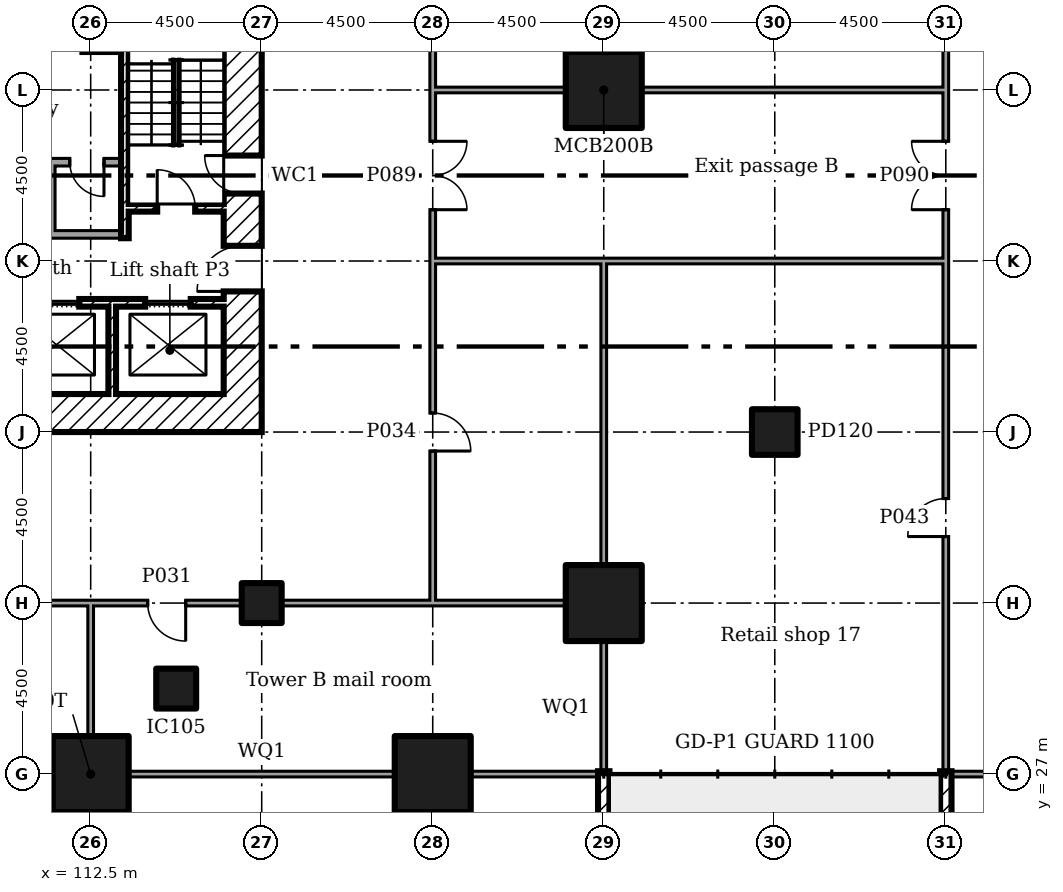
"""IFC4 building model, lengths in metres.
Left out: names, types, materials, properties, quantities, classifications, styles, units other than length and angle.
Written with IfcOpenShell. Run it as: python <this file> out.ifc"""

import sys

from ifc_helpers import new_model, si_unit, direction, frame, frame_2d, origin, origin_2d, place, context, subcontext, project, spatial, rectangle, extrude, element, fill, save


model = new_model("IFC4")
c1 = context("Model", 3, precision=1e-05, world=origin(), true_north=direction((0.0, 1.0)))
c2 = subcontext(c1, "Body", "Model", "MODEL_VIEW")
j1 = project(units=[si_unit("LENGTHUNIT", "METRE"), si_unit("PLANEANGLEUNIT", "RADIAN")], contexts=[c1])
p1 = place(None, origin())
s1 = spatial("IfcSite", under=j1, at=p1, CompositionType="ELEMENT")
p2 = place(p1, origin())
s2 = spatial("IfcBuilding", under=s1, at=p2, CompositionType="ELEMENT")
p3 = place(p2, origin())
s3 = spatial("IfcBuildingStorey", under=s2, at=p3, CompositionType="ELEMENT", Elevation=0.0)
for number, where in (
    (1, (112.5, 27.0, 0.0)),
    (2, (121.5, 27.0, 0.0)),
    (3, (126.0, 31.5, 0.0)),
    (4, (126.0, 45.0, 0.0)),
):
    element("IfcColumn", number, at=place(p3, frame(where)), inside=s3, PredefinedType="COLUMN", context=c2, shape_type="SweptSolid", body=[
        extrude(rectangle(XDim=2.0, YDim=2.0, at=origin_2d()), origin(), (0.0, 0.0, 1.0), 6.0),
    ])
for number, where in (
    (5, (114.75, 29.25, 0.0)),
    (6, (117.0, 31.5, 0.0)),
):
    element("IfcColumn", number, at=place(p3, frame(where)), inside=s3, PredefinedType="COLUMN", context=c2, shape_type="SweptSolid", body=[
        extrude(rectangle(XDim=1.05, YDim=1.05, at=origin_2d()), origin(), (0.0, 0.0, 1.0), 6.0),
    ])
p4 = place(p3, frame((130.5, 36.0, 0.0)))
e7 = element("IfcColumn", 7, at=p4, inside=s3, PredefinedType="COLUMN", context=c2, shape_type="SweptSolid", body=[
    extrude(rectangle(XDim=1.2, YDim=1.2, at=origin_2d()), origin(), (0.0, 0.0, 1.0), 6.0),
])
p5 = place(p3, frame((116.5, 36.0, 0.0), z_axis=(0.0, 0.0, 1.0), x_axis=(0.0, 1.0, 0.0)))
e8 = element("IfcWall", 8, at=p5, inside=s3, PredefinedType="SHEAR", context=c2, shape_type="SweptSolid", body=[
    extrude(rectangle(XDim=13.5, YDim=1.0, at=frame_2d((6.75, 0.0))), origin(), (0.0, 0.0, 1.0), 5.5),
])
p6 = place(p5, frame((3.7, 0.0, 0.0)))
e9 = element("IfcOpeningElement", 9, at=p6, cuts=e8, PredefinedType="OPENING", context=c2, shape_type="SweptSolid", body=[
    extrude(rectangle(XDim=1.2, YDim=2.1, at=frame_2d((0.6, 1.05))), frame((0.0, 0.51, 0.0), z_axis=(0.0, -1.0, 0.0), x_axis=(1.0, 0.0, 0.0)), (0.0, 0.0, 1.0), 1.02),
])
p7 = place(p5, frame((6.275, 0.0, 0.0)))
e10 = element("IfcOpeningElement", 10, at=p7, cuts=e8, PredefinedType="OPENING", context=c2, shape_type="SweptSolid", body=[
    extrude(rectangle(XDim=1.0, YDim=2.1, at=frame_2d((0.5, 1.05))), frame((0.0, 0.51, 0.0), z_axis=(0.0, -1.0, 0.0), x_axis=(1.0, 0.0, 0.0)), (0.0, 0.0, 1.0), 1.02),
])
p8 = place(p3, frame((104.5, 36.5, 0.0)))
e11 = element("IfcWall", 11, at=p8, inside=s3, PredefinedType="SHEAR", context=c2, shape_type="SweptSolid", body=[
    extrude(rectangle(XDim=11.5, YDim=1.0, at=frame_2d((5.75, 0.0))), origin(), (0.0, 0.0, 1.0), 5.5),
])
p9 = place(p3, frame((113.067, 37.0, 0.0), z_axis=(0.0, 0.0, 1.0), x_axis=(0.0, 1.0, 0.0)))
e12 = element("IfcWall", 12, at=p9, inside=s3, PredefinedType="SHEAR", context=c2, shape_type="SweptSolid", body=[
    extrude(rectangle(XDim=2.3, YDim=0.2, at=frame_2d((1.15, 0.0))), origin(), (0.0, 0.0, 1.0), 5.5),
])
p10 = place(p3, frame((107.2, 39.4, 0.0)))
e13 = element("IfcWall", 13, at=p10, inside=s3, PredefinedType="SHEAR", context=c2, shape_type="SweptSolid", body=[
    extrude(rectangle(XDim=8.8, YDim=0.2, at=frame_2d((4.4, 0.0))), origin(), (0.0, 0.0, 1.0), 5.5),
])
p11 = place(p10, frame((0.867, 0.0, 0.0)))
e14 = element("IfcOpeningElement", 14, at=p11, cuts=e13, PredefinedType="OPENING", context=c2, shape_type="SweptSolid", body=[
    extrude(rectangle(XDim=1.2, YDim=2.1, at=frame_2d((0.6, 1.05))), frame((0.0, 0.11, 0.0), z_axis=(0.0, -1.0, 0.0), x_axis=(1.0, 0.0, 0.0)), (0.0, 0.0, 1.0), 0.22),
])
p12 = place(p10, frame((3.8, 0.0, 0.0)))
e15 = element("IfcOpeningElement", 15, at=p12, cuts=e13, PredefinedType="OPENING", context=c2, shape_type="SweptSolid", body=[
    extrude(rectangle(XDim=1.2, YDim=2.1, at=frame_2d((0.6, 1.05))), frame((0.0, 0.11, 0.0), z_axis=(0.0, -1.0, 0.0), x_axis=(1.0, 0.0, 0.0)), (0.0, 0.0, 1.0), 0.22),
])
p13 = place(p10, frame((6.733, 0.0, 0.0)))
e16 = element("IfcOpeningElement", 16, at=p13, cuts=e13, PredefinedType="OPENING", context=c2, shape_type="SweptSolid", body=[
    extrude(rectangle(XDim=1.2, YDim=2.1, at=frame_2d((0.6, 1.05))), frame((0.0, 0.11, 0.0), z_axis=(0.0, -1.0, 0.0), x_axis=(1.0, 0.0, 0.0)), (0.0, 0.0, 1.0), 0.22),
])
p14 = place(p3, frame((113.5, 41.9, 0.0)))
e17 = element("IfcWall", 17, at=p14, inside=s3, PredefinedType="SHEAR", context=c2, shape_type="SweptSolid", body=[
    extrude(rectangle(XDim=2.5, YDim=0.2, at=frame_2d((1.25, 0.0))), origin(), (0.0, 0.0, 1.0), 5.5),
])
p15 = place(p14, frame((0.75, 0.0, 0.0)))
e18 = element("IfcOpeningElement", 18, at=p15, cuts=e17, PredefinedType="OPENING", context=c2, shape_type="SweptSolid", body=[
    extrude(rectangle(XDim=1.0, YDim=2.1, at=frame_2d((0.5, 1.05))), frame((0.0, 0.11, 0.0), z_axis=(0.0, -1.0, 0.0), x_axis=(1.0, 0.0, 0.0)), (0.0, 0.0, 1.0), 0.22),
])
p16 = place(p3, frame((113.4, 41.1, 0.0), z_axis=(0.0, 0.0, 1.0), x_axis=(0.0, 1.0, 0.0)))
e19 = element("IfcWall", 19, at=p16, inside=s3, PredefinedType="SHEAR", context=c2, shape_type="SweptSolid", body=[
    extrude(rectangle(XDim=7.4, YDim=0.2, at=frame_2d((3.7, 0.0))), origin(), (0.0, 0.0, 1.0), 5.5),
])
p17 = place(p3, frame((107.2, 43.1, 0.0)))
e20 = element("IfcWall", 20, at=p17, inside=s3, PredefinedType="PARTITIONING", context=c2, shape_type="SweptSolid", body=[
    extrude(rectangle(XDim=6.1, YDim=0.2, at=frame_2d((3.05, 0.0))), origin(), (0.0, 0.0, 1.0), 5.5),
])
p18 = place(p17, frame((4.75, 0.0, 0.0)))
e21 = element("IfcOpeningElement", 21, at=p18, cuts=e20, PredefinedType="OPENING", context=c2, shape_type="SweptSolid", body=[
    extrude(rectangle(XDim=0.9, YDim=2.1, at=frame_2d((0.45, 1.05))), frame((0.0, 0.11, 0.0), z_axis=(0.0, -1.0, 0.0), x_axis=(1.0, 0.0, 0.0)), (0.0, 0.0, 1.0), 0.22),
])
p19 = place(p3, frame((107.2, 41.2, 0.0)))
e22 = element("IfcWall", 22, at=p19, inside=s3, PredefinedType="PARTITIONING", context=c2, shape_type="SweptSolid", body=[
    extrude(rectangle(XDim=6.1, YDim=0.2, at=frame_2d((3.05, 0.0))), origin(), (0.0, 0.0, 1.0), 5.5),
])
p20 = place(p19, frame((0.4, 0.0, 0.0)))
e23 = element("IfcOpeningElement", 23, at=p20, cuts=e22, PredefinedType="OPENING", context=c2, shape_type="SweptSolid", body=[
    extrude(rectangle(XDim=0.9, YDim=2.1, at=frame_2d((0.45, 1.05))), frame((0.0, 0.11, 0.0), z_axis=(0.0, -1.0, 0.0), x_axis=(1.0, 0.0, 0.0)), (0.0, 0.0, 1.0), 0.22),
])
p21 = place(p19, frame((2.55, 0.0, 0.0)))
e24 = element("IfcOpeningElement", 24, at=p21, cuts=e22, PredefinedType="OPENING", context=c2, shape_type="SweptSolid", body=[
    extrude(rectangle(XDim=0.9, YDim=2.1, at=frame_2d((0.45, 1.05))), frame((0.0, 0.11, 0.0), z_axis=(0.0, -1.0, 0.0), x_axis=(1.0, 0.0, 0.0)), (0.0, 0.0, 1.0), 0.22),
])
p22 = place(p3, frame((111.5, 41.3, 0.0), z_axis=(0.0, 0.0, 1.0), x_axis=(0.0, 1.0, 0.0)))
e25 = element("IfcWall", 25, at=p22, inside=s3, PredefinedType="PARTITIONING", context=c2, shape_type="SweptSolid", body=[
    extrude(rectangle(XDim=1.7, YDim=0.125, at=frame_2d((0.85, 0.0))), origin(), (0.0, 0.0, 1.0), 5.5),
])
p23 = place(p3, frame((99.075, 31.5, 0.0)))
e26 = element("IfcWall", 26, at=p23, inside=s3, PredefinedType="PARTITIONING", context=c2, shape_type="SweptSolid", body=[
    extrude(rectangle(XDim=13.5, YDim=0.15, at=frame_2d((6.75, 0.0))), origin(), (0.0, 0.0, 1.0), 5.55),
])
p24 = place(p23, frame((6.175, 0.0, 0.0)))
e27 = element("IfcOpeningElement", 27, at=p24, cuts=e26, PredefinedType="OPENING", context=c2, shape_type="SweptSolid", body=[
    extrude(rectangle(XDim=1.0, YDim=2.1, at=frame_2d((0.5, 1.05))), frame((0.0, 0.085, 0.0), z_axis=(0.0, -1.0, 0.0), x_axis=(1.0, 0.0, 0.0)), (0.0, 0.0, 1.0), 0.17),
])
p25 = place(p3, frame((112.5, 31.5, 0.0)))
e28 = element("IfcWall", 28, at=p25, inside=s3, PredefinedType="PARTITIONING", context=c2, shape_type="SweptSolid", body=[
    extrude(rectangle(XDim=3.98, YDim=0.15, at=frame_2d((1.99, 0.0))), origin(), (0.0, 0.0, 1.0), 5.55),
])
p26 = place(p25, frame((1.5, 0.0, 0.0)))
e29 = element("IfcOpeningElement", 29, at=p26, cuts=e28, PredefinedType="OPENING", context=c2, shape_type="SweptSolid", body=[
    extrude(rectangle(XDim=1.0, YDim=2.1, at=frame_2d((0.5, 1.05))), frame((0.0, 0.085, 0.0), z_axis=(0.0, -1.0, 0.0), x_axis=(1.0, 0.0, 0.0)), (0.0, 0.0, 1.0), 0.17),
])
p27 = place(p3, frame((117.52, 31.5, 0.0)))
e30 = element("IfcWall", 30, at=p27, inside=s3, PredefinedType="PARTITIONING", context=c2, shape_type="SweptSolid", body=[
    extrude(rectangle(XDim=4.055, YDim=0.15, at=frame_2d((2.027, 0.0))), origin(), (0.0, 0.0, 1.0), 5.55),
])
p28 = place(p3, frame((121.5, 31.575, 0.0), z_axis=(0.0, 0.0, 1.0), x_axis=(0.0, 1.0, 0.0)))
e31 = element("IfcWall", 31, at=p28, inside=s3, PredefinedType="PARTITIONING", context=c2, shape_type="SweptSolid", body=[
    extrude(rectangle(XDim=9.0, YDim=0.15, at=frame_2d((4.5, 0.0))), origin(), (0.0, 0.0, 1.0), 5.55),
])
p29 = place(p28, frame((3.925, 0.0, 0.0)))
e32 = element("IfcOpeningElement", 32, at=p29, cuts=e31, PredefinedType="OPENING", context=c2, shape_type="SweptSolid", body=[
    extrude(rectangle(XDim=1.0, YDim=2.1, at=frame_2d((0.5, 1.05))), frame((0.0, 0.085, 0.0), z_axis=(0.0, -1.0, 0.0), x_axis=(1.0, 0.0, 0.0)), (0.0, 0.0, 1.0), 0.17),
])
p30 = place(p3, frame((121.5, 40.5, 0.0), z_axis=(0.0, 0.0, 1.0), x_axis=(0.0, 1.0, 0.0)))
e33 = element("IfcWall", 33, at=p30, inside=s3, PredefinedType="PARTITIONING", context=c2, shape_type="SweptSolid", body=[
    extrude(rectangle(XDim=4.575, YDim=0.15, at=frame_2d((2.288, 0.0))), origin(), (0.0, 0.0, 1.0), 5.55),
])
p31 = place(p30, frame((1.35, 0.0, 0.0)))
e34 = element("IfcOpeningElement", 34, at=p31, cuts=e33, PredefinedType="OPENING", context=c2, shape_type="SweptSolid", body=[
    extrude(rectangle(XDim=1.8, YDim=2.1, at=frame_2d((0.9, 1.05))), frame((0.0, 0.085, 0.0), z_axis=(0.0, -1.0, 0.0), x_axis=(1.0, 0.0, 0.0)), (0.0, 0.0, 1.0), 0.17),
])
p32 = place(p3, frame((121.5, 45.0, 0.0), z_axis=(0.0, 0.0, 1.0), x_axis=(0.0, 1.0, 0.0)))
e35 = element("IfcWall", 35, at=p32, inside=s3, PredefinedType="PARTITIONING", context=c2, shape_type="SweptSolid", body=[
    extrude(rectangle(XDim=3.98, YDim=0.15, at=frame_2d((1.99, 0.0))), origin(), (0.0, 0.0, 1.0), 5.55),
])
p33 = place(p32, frame((1.5, 0.0, 0.0)))
e36 = element("IfcOpeningElement", 36, at=p33, cuts=e35, PredefinedType="OPENING", context=c2, shape_type="SweptSolid", body=[
    extrude(rectangle(XDim=1.0, YDim=2.1, at=frame_2d((0.5, 1.05))), frame((0.0, 0.085, 0.0), z_axis=(0.0, -1.0, 0.0), x_axis=(1.0, 0.0, 0.0)), (0.0, 0.0, 1.0), 0.17),
])
p34 = place(p3, frame((112.5, 27.995, 0.0), z_axis=(0.0, 0.0, 1.0), x_axis=(0.0, 1.0, 0.0)))
e37 = element("IfcWall", 37, at=p34, inside=s3, PredefinedType="PARTITIONING", context=c2, shape_type="SweptSolid", body=[
    extrude(rectangle(XDim=3.43, YDim=0.15, at=frame_2d((1.715, 0.0))), origin(), (0.0, 0.0, 1.0), 5.55),
])
p35 = place(p3, frame((99.995, 27.0, 0.0)))
e38 = element("IfcWall", 38, at=p35, inside=s3, PredefinedType="PARTITIONING", context=c2, shape_type="SweptSolid", body=[
    extrude(rectangle(XDim=11.51, YDim=0.15, at=frame_2d((5.755, 0.0))), origin(), (0.0, 0.0, 1.0), 5.55),
])
p36 = place(p3, frame((121.5, 31.5, 0.0)))
e39 = element("IfcWall", 39, at=p36, inside=s3, PredefinedType="PARTITIONING", context=c2, shape_type="SweptSolid", body=[
    extrude(rectangle(XDim=3.505, YDim=0.15, at=frame_2d((1.752, 0.0))), origin(), (0.0, 0.0, 1.0), 5.55),
])
p37 = place(p3, frame((113.495, 27.0, 0.0)))
e40 = element("IfcWall", 40, at=p37, inside=s3, PredefinedType="PARTITIONING", context=c2, shape_type="SweptSolid", body=[
    extrude(rectangle(XDim=7.01, YDim=0.15, at=frame_2d((3.505, 0.0))), origin(), (0.0, 0.0, 1.0), 5.55),
])
p38 = place(p3, frame((122.495, 27.0, 0.0)))
e41 = element("IfcWall", 41, at=p38, inside=s3, PredefinedType="PARTITIONING", context=c2, shape_type="SweptSolid", body=[
    extrude(rectangle(XDim=3.355, YDim=0.15, at=frame_2d((1.677, 0.0))), origin(), (0.0, 0.0, 1.0), 5.55),
])
p39 = place(p3, frame((126.0, 27.0, 0.0), z_axis=(0.0, 0.0, 1.0), x_axis=(0.0, 1.0, 0.0)))
e42 = element("IfcWall", 42, at=p39, inside=s3, PredefinedType="PARTITIONING", context=c2, shape_type="SweptSolid", body=[
    extrude(rectangle(XDim=3.505, YDim=0.15, at=frame_2d((1.752, 0.0))), origin(), (0.0, 0.0, 1.0), 5.55),
])
p40 = place(p3, frame((121.575, 40.5, 0.0)))
e43 = element("IfcWall", 43, at=p40, inside=s3, PredefinedType="PARTITIONING", context=c2, shape_type="SweptSolid", body=[
    extrude(rectangle(XDim=4.5, YDim=0.15, at=frame_2d((2.25, 0.0))), origin(), (0.0, 0.0, 1.0), 5.55),
])
p41 = place(p3, frame((126.0, 32.495, 0.0), z_axis=(0.0, 0.0, 1.0), x_axis=(0.0, 1.0, 0.0)))
e44 = element("IfcWall", 44, at=p41, inside=s3, PredefinedType="PARTITIONING", context=c2, shape_type="SweptSolid", body=[
    extrude(rectangle(XDim=7.93, YDim=0.15, at=frame_2d((3.965, 0.0))), origin(), (0.0, 0.0, 1.0), 5.55),
])
p42 = place(p3, frame((121.575, 45.0, 0.0)))
e45 = element("IfcWall", 45, at=p42, inside=s3, PredefinedType="PARTITIONING", context=c2, shape_type="SweptSolid", body=[
    extrude(rectangle(XDim=3.43, YDim=0.15, at=frame_2d((1.715, 0.0))), origin(), (0.0, 0.0, 1.0), 5.55),
])
p43 = place(p3, frame((126.0, 40.5, 0.0)))
e46 = element("IfcWall", 46, at=p43, inside=s3, PredefinedType="PARTITIONING", context=c2, shape_type="SweptSolid", body=[
    extrude(rectangle(XDim=9.075, YDim=0.15, at=frame_2d((4.538, 0.0))), origin(), (0.0, 0.0, 1.0), 5.55),
])
p44 = place(p3, frame((126.995, 45.0, 0.0)))
e47 = element("IfcWall", 47, at=p44, inside=s3, PredefinedType="PARTITIONING", context=c2, shape_type="SweptSolid", body=[
    extrude(rectangle(XDim=8.08, YDim=0.15, at=frame_2d((4.04, 0.0))), origin(), (0.0, 0.0, 1.0), 5.55),
])
p45 = place(p3, frame((135.0, 40.5, 0.0), z_axis=(0.0, 0.0, 1.0), x_axis=(0.0, 1.0, 0.0)))
e48 = element("IfcWall", 48, at=p45, inside=s3, PredefinedType="PARTITIONING", context=c2, shape_type="SweptSolid", body=[
    extrude(rectangle(XDim=4.425, YDim=0.15, at=frame_2d((2.212, 0.0))), origin(), (0.0, 0.0, 1.0), 5.55),
])
p46 = place(p45, frame((1.35, 0.0, 0.0)))
e49 = element("IfcOpeningElement", 49, at=p46, cuts=e48, PredefinedType="OPENING", context=c2, shape_type="SweptSolid", body=[
    extrude(rectangle(XDim=1.8, YDim=2.1, at=frame_2d((0.9, 1.05))), frame((0.0, 0.085, 0.0), z_axis=(0.0, -1.0, 0.0), x_axis=(1.0, 0.0, 0.0)), (0.0, 0.0, 1.0), 0.17),
])
p47 = place(p3, frame((126.0, 45.995, 0.0), z_axis=(0.0, 0.0, 1.0), x_axis=(0.0, 1.0, 0.0)))
e50 = element("IfcWall", 50, at=p47, inside=s3, PredefinedType="PARTITIONING", context=c2, shape_type="SweptSolid", body=[
    extrude(rectangle(XDim=7.01, YDim=0.15, at=frame_2d((3.505, 0.0))), origin(), (0.0, 0.0, 1.0), 5.55),
])
p48 = place(p3, frame((112.5, 18.075, 0.0), z_axis=(0.0, 0.0, 1.0), x_axis=(0.0, 1.0, 0.0)))
e51 = element("IfcWall", 51, at=p48, inside=s3, PredefinedType="PARTITIONING", context=c2, shape_type="SweptSolid", body=[
    extrude(rectangle(XDim=7.93, YDim=0.15, at=frame_2d((3.965, 0.0))), origin(), (0.0, 0.0, 1.0), 5.55),
])
p49 = place(p3, frame((135.15, 27.0, 0.0)))
e52 = element("IfcWall", 52, at=p49, inside=s3, PredefinedType="PARTITIONING", context=c2, shape_type="SweptSolid", body=[
    extrude(rectangle(XDim=4.25, YDim=0.15, at=frame_2d((2.125, 0.0))), origin(), (0.0, 0.0, 1.0), 5.55),
])
p50 = place(p49, frame((1.2, 0.0, 0.0)))
e53 = element("IfcOpeningElement", 53, at=p50, cuts=e52, PredefinedType="OPENING", context=c2, shape_type="SweptSolid", body=[
    extrude(rectangle(XDim=1.8, YDim=2.1, at=frame_2d((0.9, 1.05))), frame((0.0, 0.085, 0.0), z_axis=(0.0, -1.0, 0.0), x_axis=(1.0, 0.0, 0.0)), (0.0, 0.0, 1.0), 0.17),
])
p51 = place(p3, frame((135.0, 27.0, 0.0), z_axis=(0.0, 0.0, 1.0), x_axis=(0.0, 1.0, 0.0)))
e54 = element("IfcWall", 54, at=p51, inside=s3, PredefinedType="PARTITIONING", context=c2, shape_type="SweptSolid", body=[
    extrude(rectangle(XDim=13.425, YDim=0.15, at=frame_2d((6.712, 0.0))), origin(), (0.0, 0.0, 1.0), 5.55),
])
p52 = place(p51, frame((6.25, 0.0, 0.0)))
e55 = element("IfcOpeningElement", 55, at=p52, cuts=e54, PredefinedType="OPENING", context=c2, shape_type="SweptSolid", body=[
    extrude(rectangle(XDim=1.0, YDim=2.1, at=frame_2d((0.5, 1.05))), frame((0.0, 0.085, 0.0), z_axis=(0.0, -1.0, 0.0), x_axis=(1.0, 0.0, 0.0)), (0.0, 0.0, 1.0), 0.17),
])
p53 = place(p3, frame((135.0, 45.0, 0.0), z_axis=(0.0, 0.0, 1.0), x_axis=(0.0, 1.0, 0.0)))
e56 = element("IfcWall", 56, at=p53, inside=s3, PredefinedType="PARTITIONING", context=c2, shape_type="SweptSolid", body=[
    extrude(rectangle(XDim=13.575, YDim=0.15, at=frame_2d((6.788, 0.0))), origin(), (0.0, 0.0, 1.0), 5.55),
])
p54 = place(p53, frame((6.25, 0.0, 0.0)))
e57 = element("IfcOpeningElement", 57, at=p54, cuts=e56, PredefinedType="OPENING", context=c2, shape_type="SweptSolid", body=[
    extrude(rectangle(XDim=1.0, YDim=2.1, at=frame_2d((0.5, 1.05))), frame((0.0, 0.085, 0.0), z_axis=(0.0, -1.0, 0.0), x_axis=(1.0, 0.0, 0.0)), (0.0, 0.0, 1.0), 0.17),
])
for number, where, z_axis, x_axis in (
    (58, (126.0, 1.5, 0.0), (0.0, 0.0, 1.0), (0.0, 1.0, 0.0)),
    (59, (135.0, 1.5, 0.0), (0.0, 0.0, 1.0), (0.0, 1.0, 0.0)),
):
    element("IfcWall", number, at=place(p3, frame(where, z_axis=z_axis, x_axis=x_axis)), inside=s3, PredefinedType="SOLIDWALL", context=c2, shape_type="SweptSolid", body=[
        extrude(rectangle(XDim=25.575, YDim=0.3, at=frame_2d((12.788, 0.0))), origin(), (0.0, 0.0, 1.0), 1.1),
    ])
p55 = place(p6, origin())
e60 = element("IfcDoor", 60, at=p55, inside=s3, OperationType="SINGLE_SWING_RIGHT", PredefinedType="DOOR", context=c2, shape_type="SweptSolid", body=[
    extrude(rectangle(XDim=1.2, YDim=2.1, at=frame_2d((0.6, 1.05))), frame((0.0, 0.025, 0.0), z_axis=(0.0, -1.0, 0.0), x_axis=(1.0, 0.0, 0.0)), (0.0, 0.0, 1.0), 0.05),
])
fill(e9, e60)
p56 = place(p15, origin())
e61 = element("IfcDoor", 61, at=p56, inside=s3, OperationType="SINGLE_SWING_RIGHT", PredefinedType="DOOR", context=c2, shape_type="SweptSolid", body=[
    extrude(rectangle(XDim=1.0, YDim=2.1, at=frame_2d((0.5, 1.05))), frame((0.0, 0.025, 0.0), z_axis=(0.0, -1.0, 0.0), x_axis=(1.0, 0.0, 0.0)), (0.0, 0.0, 1.0), 0.05),
])
fill(e18, e61)
p57 = place(p7, origin())
e62 = element("IfcDoor", 62, at=p57, inside=s3, OperationType="SINGLE_SWING_LEFT", PredefinedType="DOOR", context=c2, shape_type="SweptSolid", body=[
    extrude(rectangle(XDim=1.0, YDim=2.1, at=frame_2d((0.5, 1.05))), frame((0.0, 0.025, 0.0), z_axis=(0.0, -1.0, 0.0), x_axis=(1.0, 0.0, 0.0)), (0.0, 0.0, 1.0), 0.05),
])
fill(e10, e62)
p58 = place(p18, frame((0.9, 0.0, 0.0), x_axis=(-1.0, 0.0, 0.0)))
e63 = element("IfcDoor", 63, at=p58, inside=s3, OperationType="SINGLE_SWING_RIGHT", PredefinedType="DOOR", context=c2, shape_type="SweptSolid", body=[
    extrude(rectangle(XDim=0.9, YDim=2.1, at=frame_2d((0.45, 1.05))), frame((0.0, 0.025, 0.0), z_axis=(0.0, -1.0, 0.0), x_axis=(1.0, 0.0, 0.0)), (0.0, 0.0, 1.0), 0.05),
])
fill(e21, e63)
p59 = place(p12, origin())
e64 = element("IfcDoor", 64, at=p59, inside=s3, OperationType="SLIDING_TO_LEFT", PredefinedType="DOOR", context=c2, shape_type="SweptSolid", body=[
    extrude(rectangle(XDim=1.2, YDim=2.1, at=frame_2d((0.6, 1.05))), frame((0.0, 0.025, 0.0), z_axis=(0.0, -1.0, 0.0), x_axis=(1.0, 0.0, 0.0)), (0.0, 0.0, 1.0), 0.05),
])
fill(e15, e64)
p60 = place(p13, origin())
e65 = element("IfcDoor", 65, at=p60, inside=s3, OperationType="SLIDING_TO_LEFT", PredefinedType="DOOR", context=c2, shape_type="SweptSolid", body=[
    extrude(rectangle(XDim=1.2, YDim=2.1, at=frame_2d((0.6, 1.05))), frame((0.0, 0.025, 0.0), z_axis=(0.0, -1.0, 0.0), x_axis=(1.0, 0.0, 0.0)), (0.0, 0.0, 1.0), 0.05),
])
fill(e16, e65)
p61 = place(p26, frame((1.0, 0.0, 0.0), x_axis=(-1.0, 0.0, 0.0)))
e66 = element("IfcDoor", 66, at=p61, inside=s3, OperationType="SINGLE_SWING_RIGHT", PredefinedType="DOOR", context=c2, shape_type="SweptSolid", body=[
    extrude(rectangle(XDim=1.0, YDim=2.1, at=frame_2d((0.5, 1.05))), frame((0.0, 0.025, 0.0), z_axis=(0.0, -1.0, 0.0), x_axis=(1.0, 0.0, 0.0)), (0.0, 0.0, 1.0), 0.05),
])
fill(e29, e66)
p62 = place(p29, frame((1.0, 0.0, 0.0), x_axis=(-1.0, 0.0, 0.0)))
e67 = element("IfcDoor", 67, at=p62, inside=s3, OperationType="SINGLE_SWING_LEFT", PredefinedType="DOOR", context=c2, shape_type="SweptSolid", body=[
    extrude(rectangle(XDim=1.0, YDim=2.1, at=frame_2d((0.5, 1.05))), frame((0.0, 0.025, 0.0), z_axis=(0.0, -1.0, 0.0), x_axis=(1.0, 0.0, 0.0)), (0.0, 0.0, 1.0), 0.05),
])
fill(e32, e67)
p63 = place(p52, origin())
e68 = element("IfcDoor", 68, at=p63, inside=s3, OperationType="SINGLE_SWING_RIGHT", PredefinedType="DOOR", context=c2, shape_type="SweptSolid", body=[
    extrude(rectangle(XDim=1.0, YDim=2.1, at=frame_2d((0.5, 1.05))), frame((0.0, 0.025, 0.0), z_axis=(0.0, -1.0, 0.0), x_axis=(1.0, 0.0, 0.0)), (0.0, 0.0, 1.0), 0.05),
])
fill(e55, e68)
p64 = place(p31, frame((1.8, 0.0, 0.0), x_axis=(-1.0, 0.0, 0.0)))
e69 = element("IfcDoor", 69, at=p64, inside=s3, OperationType="DOUBLE_DOOR_SINGLE_SWING", PredefinedType="DOOR", context=c2, shape_type="SweptSolid", body=[
    extrude(rectangle(XDim=1.8, YDim=2.1, at=frame_2d((0.9, 1.05))), frame((0.0, 0.025, 0.0), z_axis=(0.0, -1.0, 0.0), x_axis=(1.0, 0.0, 0.0)), (0.0, 0.0, 1.0), 0.05),
])
fill(e34, e69)
p65 = place(p46, origin())
e70 = element("IfcDoor", 70, at=p65, inside=s3, OperationType="DOUBLE_DOOR_SINGLE_SWING", PredefinedType="DOOR", context=c2, shape_type="SweptSolid", body=[
    extrude(rectangle(XDim=1.8, YDim=2.1, at=frame_2d((0.9, 1.05))), frame((0.0, 0.025, 0.0), z_axis=(0.0, -1.0, 0.0), x_axis=(1.0, 0.0, 0.0)), (0.0, 0.0, 1.0), 0.05),
])
fill(e49, e70)
save(model, sys.argv[1])
